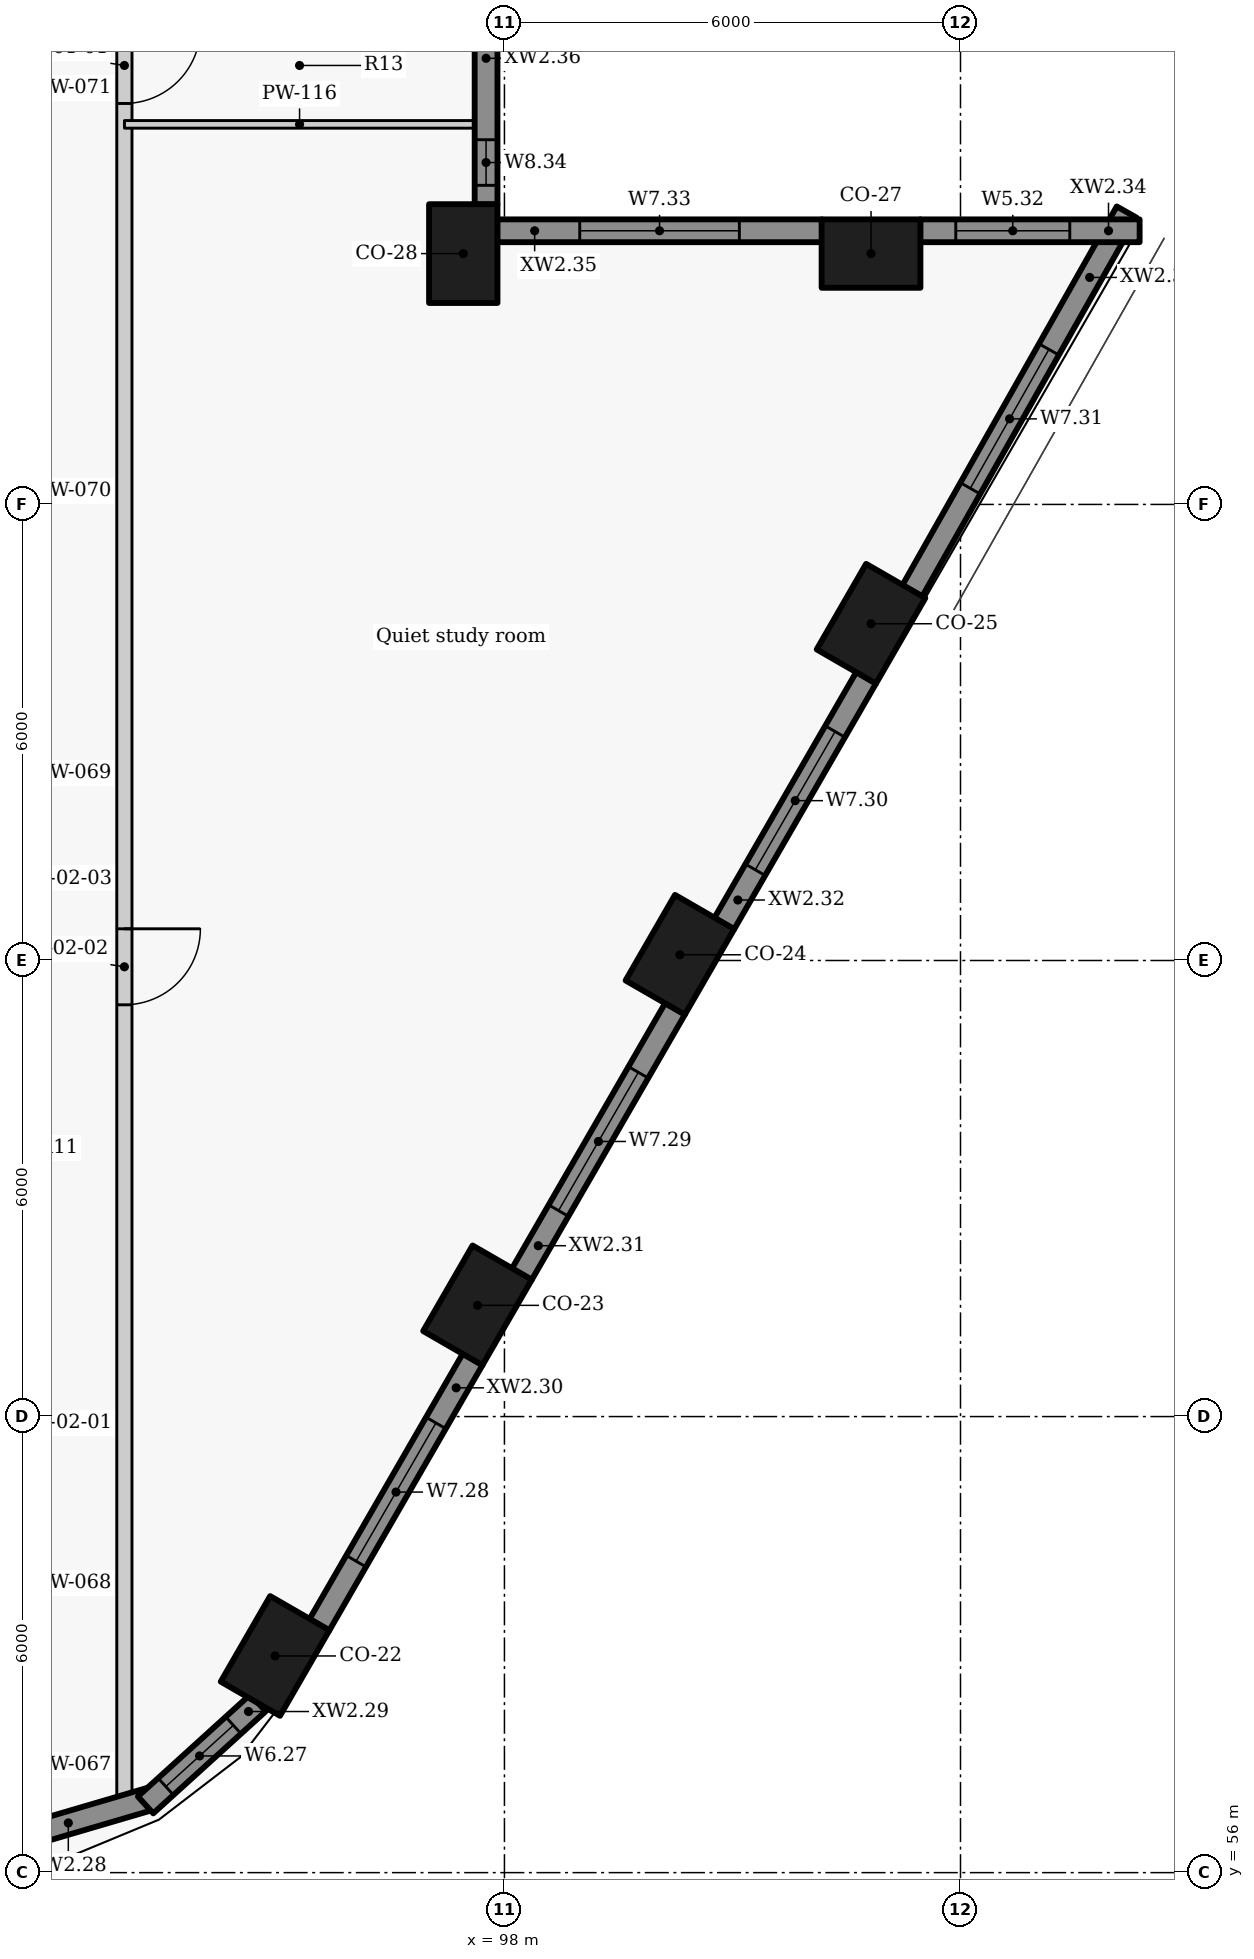
"""IFC4 building model, lengths in metres.
Left out: names, types, materials, properties, quantities, classifications, styles, units other than length and angle.
Written with IfcOpenShell. Run it as: python <this file> out.ifc"""

import sys

from ifc_helpers import new_model, si_unit, direction, frame, frame_2d, origin, origin_2d, place, context, subcontext, project, spatial, rectangle, extrude, element, fill, save


model = new_model("IFC4")
c1 = context("Model", 3, precision=1e-05, world=origin(), true_north=direction((0.0, 1.0)))
c2 = subcontext(c1, "Body", "Model", "MODEL_VIEW")
j1 = project(units=[si_unit("LENGTHUNIT", "METRE"), si_unit("PLANEANGLEUNIT", "RADIAN")], contexts=[c1])
p1 = place(None, origin())
s1 = spatial("IfcSite", under=j1, at=p1, CompositionType="ELEMENT")
p2 = place(p1, origin())
s2 = spatial("IfcBuilding", under=s1, at=p2, CompositionType="ELEMENT")
p3 = place(p2, frame((0.0, 0.0, 150.3)))
s3 = spatial("IfcBuildingStorey", under=s2, at=p3, CompositionType="ELEMENT", Elevation=150.3)
for number, where, z_axis, x_axis in (
    (1, (94.982, 58.851, 0.0), (0.0, 0.0, 1.0), (0.5, 0.866, 0.0)),
    (2, (97.646, 63.463, 0.0), (0.0, 0.0, 1.0), (0.5, 0.866, 0.0)),
    (3, (100.308, 68.075, 0.0), (0.0, 0.0, 1.0), (0.5, 0.866, 0.0)),
    (4, (102.823, 72.43, 0.0), (0.0, 0.0, 1.0), (0.5, 0.866, 0.0)),
    (5, (102.823, 77.3, 0.0), (0.0, 0.0, 1.0), (-1.0, 0.0, 0.0)),
    (6, (97.458, 77.3, 0.0), (0.0, 0.0, 1.0), (0.0, 1.0, 0.0)),
):
    element("IfcColumn", number, at=place(p3, frame(where, z_axis=z_axis, x_axis=x_axis)), inside=s3, PredefinedType="COLUMN", context=c2, shape_type="SweptSolid", body=[
        extrude(rectangle(XDim=1.3, YDim=0.9, at=origin_2d()), origin(), (0.0, 0.0, 1.0), 3.3),
    ])
p4 = place(p3, frame((91.153, 56.328, 0.0), z_axis=(0.0, 0.0, 1.0), x_axis=(0.959473072336, 0.281800325517, 0.0)))
e7 = element("IfcWall", 7, at=p4, inside=s3, PredefinedType="SOLIDWALL", context=c2, shape_type="SweptSolid", body=[
    extrude(rectangle(XDim=2.312, YDim=0.3, at=frame_2d((1.156, 0.0))), origin(), (0.0, 0.0, 1.0), 2.425),
])
p5 = place(p3, frame((93.278, 56.89, 0.0), z_axis=(0.0, 0.0, 1.0), x_axis=(0.740652597499, 0.671888182526, 0.0)))
e8 = element("IfcWall", 8, at=p5, inside=s3, PredefinedType="SOLIDWALL", context=c2, shape_type="SweptSolid", body=[
    extrude(rectangle(XDim=1.999, YDim=0.3, at=frame_2d((1.0, 0.0))), origin(), (0.0, 0.0, 1.0), 2.425),
])
p6 = place(p5, frame((0.36, 0.0, 0.9)))
e9 = element("IfcOpeningElement", 9, at=p6, cuts=e8, PredefinedType="OPENING", context=c2, shape_type="SweptSolid", body=[
    extrude(rectangle(XDim=1.2, YDim=1.1, at=frame_2d((0.6, 0.55))), frame((0.0, 0.16, 0.0), z_axis=(0.0, -1.0, 0.0), x_axis=(1.0, 0.0, 0.0)), (0.0, 0.0, 1.0), 0.32),
])
p7 = place(p3, frame((95.565, 59.26, 0.0), z_axis=(0.0, 0.0, 1.0), x_axis=(0.500031546601, 0.86600718958, 0.0)))
e10 = element("IfcWall", 10, at=p7, inside=s3, PredefinedType="SOLIDWALL", context=c2, shape_type="SweptSolid", body=[
    extrude(rectangle(XDim=4.034, YDim=0.3, at=frame_2d((2.017, 0.0))), origin(), (0.0, 0.0, 1.0), 2.425),
])
p8 = place(p7, frame((0.967, 0.0, 0.9)))
e11 = element("IfcOpeningElement", 11, at=p8, cuts=e10, PredefinedType="OPENING", context=c2, shape_type="SweptSolid", body=[
    extrude(rectangle(XDim=2.1, YDim=1.1, at=frame_2d((1.05, 0.55))), frame((0.0, 0.16, 0.0), z_axis=(0.0, -1.0, 0.0), x_axis=(1.0, 0.0, 0.0)), (0.0, 0.0, 1.0), 0.32),
])
p9 = place(p3, frame((98.228, 63.872, 0.0), z_axis=(0.0, 0.0, 1.0), x_axis=(0.500031546601, 0.86600718958, 0.0)))
e12 = element("IfcWall", 12, at=p9, inside=s3, PredefinedType="SOLIDWALL", context=c2, shape_type="SweptSolid", body=[
    extrude(rectangle(XDim=4.034, YDim=0.3, at=frame_2d((2.017, 0.0))), origin(), (0.0, 0.0, 1.0), 2.425),
])
p10 = place(p9, frame((0.967, 0.0, 0.9)))
e13 = element("IfcOpeningElement", 13, at=p10, cuts=e12, PredefinedType="OPENING", context=c2, shape_type="SweptSolid", body=[
    extrude(rectangle(XDim=2.1, YDim=1.1, at=frame_2d((1.05, 0.55))), frame((0.0, 0.16, 0.0), z_axis=(0.0, -1.0, 0.0), x_axis=(1.0, 0.0, 0.0)), (0.0, 0.0, 1.0), 0.32),
])
p11 = place(p3, frame((100.891, 68.485, 0.0), z_axis=(0.0, 0.0, 1.0), x_axis=(0.499933594891, 0.866063739398, 0.0)))
e14 = element("IfcWall", 14, at=p11, inside=s3, PredefinedType="SOLIDWALL", context=c2, shape_type="SweptSolid", body=[
    extrude(rectangle(XDim=3.737, YDim=0.3, at=frame_2d((1.868, 0.0))), origin(), (0.0, 0.0, 1.0), 2.425),
])
p12 = place(p11, frame((0.818, 0.0, 0.9)))
e15 = element("IfcOpeningElement", 15, at=p12, cuts=e14, PredefinedType="OPENING", context=c2, shape_type="SweptSolid", body=[
    extrude(rectangle(XDim=2.1, YDim=1.1, at=frame_2d((1.05, 0.55))), frame((0.0, 0.16, 0.0), z_axis=(0.0, -1.0, 0.0), x_axis=(1.0, 0.0, 0.0)), (0.0, 0.0, 1.0), 0.32),
])
p13 = place(p3, frame((103.366, 72.863, 0.0), z_axis=(0.0, 0.0, 1.0), x_axis=(0.492498306264, 0.87031340236, 0.0)))
e16 = element("IfcWall", 16, at=p13, inside=s3, PredefinedType="SOLIDWALL", context=c2, shape_type="SweptSolid", body=[
    extrude(rectangle(XDim=5.727, YDim=0.3, at=frame_2d((2.863, 0.0))), origin(), (0.0, 0.0, 1.0), 2.425),
])
p14 = place(p13, frame((1.55, 0.0, 0.9)))
e17 = element("IfcOpeningElement", 17, at=p14, cuts=e16, PredefinedType="OPENING", context=c2, shape_type="SweptSolid", body=[
    extrude(rectangle(XDim=2.1, YDim=1.1, at=frame_2d((1.05, 0.55))), frame((0.0, 0.16, 0.0), z_axis=(0.0, -1.0, 0.0), x_axis=(1.0, 0.0, 0.0)), (0.0, 0.0, 1.0), 0.32),
])
p15 = place(p3, frame((106.357, 77.6, 0.0), z_axis=(0.0, 0.0, 1.0), x_axis=(-1.0, 0.0, 0.0)))
e18 = element("IfcWall", 18, at=p15, inside=s3, PredefinedType="SOLIDWALL", context=c2, shape_type="SweptSolid", body=[
    extrude(rectangle(XDim=2.888, YDim=0.3, at=frame_2d((1.444, 0.0))), origin(), (0.0, 0.0, 1.0), 2.425),
])
p16 = place(p15, frame((0.919, 0.0, 0.9)))
e19 = element("IfcOpeningElement", 19, at=p16, cuts=e18, PredefinedType="OPENING", context=c2, shape_type="SweptSolid", body=[
    extrude(rectangle(XDim=1.5, YDim=1.1, at=frame_2d((0.75, 0.55))), frame((0.0, 0.16, 0.0), z_axis=(0.0, -1.0, 0.0), x_axis=(1.0, 0.0, 0.0)), (0.0, 0.0, 1.0), 0.32),
])
p17 = place(p3, frame((102.177, 77.6, 0.0), z_axis=(0.0, 0.0, 1.0), x_axis=(-1.0, 0.0, 0.0)))
e20 = element("IfcWall", 20, at=p17, inside=s3, PredefinedType="SOLIDWALL", context=c2, shape_type="SweptSolid", body=[
    extrude(rectangle(XDim=4.273, YDim=0.3, at=frame_2d((2.136, 0.0))), origin(), (0.0, 0.0, 1.0), 2.425),
])
p18 = place(p17, frame((1.086, 0.0, 0.9)))
e21 = element("IfcOpeningElement", 21, at=p18, cuts=e20, PredefinedType="OPENING", context=c2, shape_type="SweptSolid", body=[
    extrude(rectangle(XDim=2.1, YDim=1.1, at=frame_2d((1.05, 0.55))), frame((0.0, 0.16, 0.0), z_axis=(0.0, -1.0, 0.0), x_axis=(1.0, 0.0, 0.0)), (0.0, 0.0, 1.0), 0.32),
])
p19 = place(p3, frame((97.758, 77.946, 0.0), z_axis=(0.0, 0.0, 1.0), x_axis=(0.0, 1.0, 0.0)))
e22 = element("IfcWall", 22, at=p19, inside=s3, PredefinedType="SOLIDWALL", context=c2, shape_type="SweptSolid", body=[
    extrude(rectangle(XDim=4.308, YDim=0.3, at=frame_2d((2.154, 0.0))), origin(), (0.0, 0.0, 1.0), 2.425),
])
p20 = place(p19, frame((0.252, 0.0, 0.9)))
e23 = element("IfcOpeningElement", 23, at=p20, cuts=e22, PredefinedType="OPENING", context=c2, shape_type="SweptSolid", body=[
    extrude(rectangle(XDim=0.6, YDim=1.1, at=frame_2d((0.3, 0.55))), frame((0.0, 0.16, 0.0), z_axis=(0.0, -1.0, 0.0), x_axis=(1.0, 0.0, 0.0)), (0.0, 0.0, 1.0), 0.32),
])
p21 = place(p19, frame((2.994, 0.0, 1.5)))
e24 = element("IfcOpeningElement", 24, at=p21, cuts=e22, PredefinedType="OPENING", context=c2, shape_type="SweptSolid", body=[
    extrude(rectangle(XDim=0.9, YDim=0.5, at=frame_2d((0.45, 0.25))), frame((0.0, 0.16, 0.0), z_axis=(0.0, -1.0, 0.0), x_axis=(1.0, 0.0, 0.0)), (0.0, 0.0, 1.0), 0.32),
])
p22 = place(p3, frame((93.0, 102.498, 0.0), z_axis=(0.0, 0.0, 1.0), x_axis=(0.0, -1.0, 0.0)))
e25 = element("IfcWall", 25, at=p22, inside=s3, PredefinedType="PARTITIONING", context=c2, shape_type="SweptSolid", body=[
    extrude(rectangle(XDim=45.665, YDim=0.2, at=frame_2d((22.833, 0.0))), origin(), (0.0, 0.0, 1.0), 2.405),
])
p23 = place(p22, frame((34.081, 0.0, 0.0)))
e26 = element("IfcOpeningElement", 26, at=p23, cuts=e25, PredefinedType="OPENING", context=c2, shape_type="SweptSolid", body=[
    extrude(rectangle(XDim=1.0, YDim=2.1, at=frame_2d((0.5, 1.05))), frame((0.0, 0.11, 0.0), z_axis=(0.0, -1.0, 0.0), x_axis=(1.0, 0.0, 0.0)), (0.0, 0.0, 1.0), 0.22),
])
p24 = place(p22, frame((22.223, 0.0, 0.0)))
e27 = element("IfcOpeningElement", 27, at=p24, cuts=e25, PredefinedType="OPENING", context=c2, shape_type="SweptSolid", body=[
    extrude(rectangle(XDim=1.0, YDim=2.1, at=frame_2d((0.5, 1.05))), frame((0.0, 0.11, 0.0), z_axis=(0.0, -1.0, 0.0), x_axis=(1.0, 0.0, 0.0)), (0.0, 0.0, 1.0), 0.22),
])
p25 = place(p22, frame((6.251, 0.0, 0.0)))
e28 = element("IfcOpeningElement", 28, at=p25, cuts=e25, PredefinedType="OPENING", context=c2, shape_type="SweptSolid", body=[
    extrude(rectangle(XDim=1.0, YDim=2.1, at=frame_2d((0.5, 1.05))), frame((0.0, 0.11, 0.0), z_axis=(0.0, -1.0, 0.0), x_axis=(1.0, 0.0, 0.0)), (0.0, 0.0, 1.0), 0.22),
])
p26 = place(p3, frame((93.001, 79.0, 0.0), z_axis=(0.0, 0.0, 1.0), x_axis=(1.0, 0.0, 0.0)))
e29 = element("IfcWall", 29, at=p26, inside=s3, PredefinedType="PARTITIONING", context=c2, shape_type="SweptSolid", body=[
    extrude(rectangle(XDim=4.607, YDim=0.1, at=frame_2d((2.304, 0.0))), origin(), (0.0, 0.0, 1.0), 2.405),
])
p27 = place(p6, origin())
e30 = element("IfcWindow", 30, at=p27, inside=s3, PartitioningType="SINGLE_PANEL", PredefinedType="WINDOW", context=c2, shape_type="SweptSolid", body=[
    extrude(rectangle(XDim=1.2, YDim=1.1, at=frame_2d((0.6, 0.55))), frame((0.0, 0.03, 0.0), z_axis=(0.0, -1.0, 0.0), x_axis=(1.0, 0.0, 0.0)), (0.0, 0.0, 1.0), 0.06),
])
fill(e9, e30)
p28 = place(p8, origin())
e31 = element("IfcWindow", 31, at=p28, inside=s3, PartitioningType="SINGLE_PANEL", PredefinedType="WINDOW", context=c2, shape_type="SweptSolid", body=[
    extrude(rectangle(XDim=2.1, YDim=1.1, at=frame_2d((1.05, 0.55))), frame((0.0, 0.03, 0.0), z_axis=(0.0, -1.0, 0.0), x_axis=(1.0, 0.0, 0.0)), (0.0, 0.0, 1.0), 0.06),
])
fill(e11, e31)
p29 = place(p10, origin())
e32 = element("IfcWindow", 32, at=p29, inside=s3, PartitioningType="SINGLE_PANEL", PredefinedType="WINDOW", context=c2, shape_type="SweptSolid", body=[
    extrude(rectangle(XDim=2.1, YDim=1.1, at=frame_2d((1.05, 0.55))), frame((0.0, 0.03, 0.0), z_axis=(0.0, -1.0, 0.0), x_axis=(1.0, 0.0, 0.0)), (0.0, 0.0, 1.0), 0.06),
])
fill(e13, e32)
p30 = place(p12, origin())
e33 = element("IfcWindow", 33, at=p30, inside=s3, PartitioningType="SINGLE_PANEL", PredefinedType="WINDOW", context=c2, shape_type="SweptSolid", body=[
    extrude(rectangle(XDim=2.1, YDim=1.1, at=frame_2d((1.05, 0.55))), frame((0.0, 0.03, 0.0), z_axis=(0.0, -1.0, 0.0), x_axis=(1.0, 0.0, 0.0)), (0.0, 0.0, 1.0), 0.06),
])
fill(e15, e33)
p31 = place(p14, origin())
e34 = element("IfcWindow", 34, at=p31, inside=s3, PartitioningType="SINGLE_PANEL", PredefinedType="WINDOW", context=c2, shape_type="SweptSolid", body=[
    extrude(rectangle(XDim=2.1, YDim=1.1, at=frame_2d((1.05, 0.55))), frame((0.0, 0.03, 0.0), z_axis=(0.0, -1.0, 0.0), x_axis=(1.0, 0.0, 0.0)), (0.0, 0.0, 1.0), 0.06),
])
fill(e17, e34)
p32 = place(p16, origin())
e35 = element("IfcWindow", 35, at=p32, inside=s3, PartitioningType="SINGLE_PANEL", PredefinedType="WINDOW", context=c2, shape_type="SweptSolid", body=[
    extrude(rectangle(XDim=1.5, YDim=1.1, at=frame_2d((0.75, 0.55))), frame((0.0, 0.03, 0.0), z_axis=(0.0, -1.0, 0.0), x_axis=(1.0, 0.0, 0.0)), (0.0, 0.0, 1.0), 0.06),
])
fill(e19, e35)
p33 = place(p18, origin())
e36 = element("IfcWindow", 36, at=p33, inside=s3, PartitioningType="SINGLE_PANEL", PredefinedType="WINDOW", context=c2, shape_type="SweptSolid", body=[
    extrude(rectangle(XDim=2.1, YDim=1.1, at=frame_2d((1.05, 0.55))), frame((0.0, 0.03, 0.0), z_axis=(0.0, -1.0, 0.0), x_axis=(1.0, 0.0, 0.0)), (0.0, 0.0, 1.0), 0.06),
])
fill(e21, e36)
p34 = place(p20, origin())
e37 = element("IfcWindow", 37, at=p34, inside=s3, PartitioningType="SINGLE_PANEL", PredefinedType="WINDOW", context=c2, shape_type="SweptSolid", body=[
    extrude(rectangle(XDim=0.6, YDim=1.1, at=frame_2d((0.3, 0.55))), frame((0.0, 0.03, 0.0), z_axis=(0.0, -1.0, 0.0), x_axis=(1.0, 0.0, 0.0)), (0.0, 0.0, 1.0), 0.06),
])
fill(e23, e37)
p35 = place(p23, origin())
e38 = element("IfcDoor", 38, at=p35, inside=s3, OperationType="SINGLE_SWING_LEFT", PredefinedType="DOOR", context=c2, shape_type="SweptSolid", body=[
    extrude(rectangle(XDim=1.0, YDim=2.1, at=frame_2d((0.5, 1.05))), frame((0.0, 0.025, 0.0), z_axis=(0.0, -1.0, 0.0), x_axis=(1.0, 0.0, 0.0)), (0.0, 0.0, 1.0), 0.05),
])
fill(e26, e38)
p36 = place(p24, origin())
e39 = element("IfcDoor", 39, at=p36, inside=s3, OperationType="SINGLE_SWING_LEFT", PredefinedType="DOOR", context=c2, shape_type="SweptSolid", body=[
    extrude(rectangle(XDim=1.0, YDim=2.1, at=frame_2d((0.5, 1.05))), frame((0.0, 0.025, 0.0), z_axis=(0.0, -1.0, 0.0), x_axis=(1.0, 0.0, 0.0)), (0.0, 0.0, 1.0), 0.05),
])
fill(e27, e39)
save(model, sys.argv[1])
